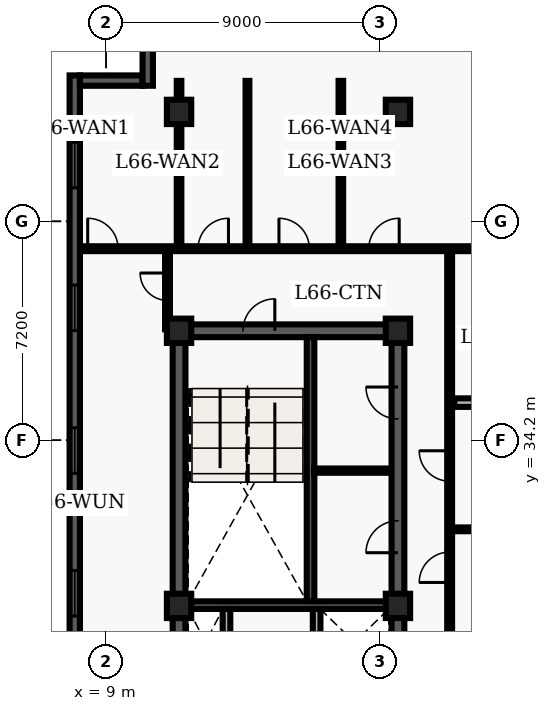
"""IFC4 building model, lengths in metres.
Left out: names, types, materials, properties, quantities, classifications, styles, units other than length and angle.
Written with IfcOpenShell. Run it as: python <this file> out.ifc"""

import sys

from ifc_helpers import new_model, entity, si_unit, converted_unit, direction, frame, origin_with_axes, origin_2d_with_axis, place, context, subcontext, project, spatial, polyline, rectangle, outline, extrude, element, fill, save


model = new_model("IFC4")
c1 = context("Model", 3, precision=1e-05, world=origin_with_axes(), true_north=direction((0.0, 1.0)))
c2 = subcontext(c1, "Body", "Model", "MODEL_VIEW")
j1 = project(units=[si_unit("LENGTHUNIT", "METRE"), converted_unit("PLANEANGLEUNIT", "DEGREE", entity("IfcPlaneAngleMeasure", 0.017), si_unit("PLANEANGLEUNIT", "RADIAN"), dimensions=[0, 0, 0, 0, 0, 0, 0])], contexts=[c1])
p1 = place(None, origin_with_axes())
s1 = spatial("IfcSite", under=j1, at=p1, CompositionType="ELEMENT")
p2 = place(p1, origin_with_axes())
s2 = spatial("IfcBuilding", under=s1, at=p2, CompositionType="ELEMENT")
p3 = place(p2, frame((0.0, 0.0, 268.5), z_axis=(0.0, 0.0, 1.0), x_axis=(1.0, 0.0, 0.0)))
s3 = spatial("IfcBuildingStorey", under=s2, at=p3, CompositionType="ELEMENT", Elevation=268.5)
p4 = place(p3, frame((11.4, 10.8, 0.0), z_axis=(0.0, 0.0, 1.0), x_axis=(0.0, 1.0, 0.0)))
e1 = element("IfcWall", 1, at=p4, inside=s3, PredefinedType="SHEAR", context=c2, shape_type="SweptSolid", body=[
    extrude(outline(polyline([(0.0, -0.21), (27.0, -0.21), (27.0, 0.21), (0.0, 0.21), (0.0, -0.21)])), origin_with_axes(), (0.0, 0.0, 1.0), 3.66),
])
p5 = place(p3, frame((11.4, 37.8, 0.0), z_axis=(0.0, 0.0, 1.0), x_axis=(1.0, 0.0, 0.0)))
e2 = element("IfcWall", 2, at=p5, inside=s3, PredefinedType="SHEAR", context=c2, shape_type="SweptSolid", body=[
    extrude(outline(polyline([(0.0, -0.21), (7.2, -0.21), (7.2, 0.21), (0.0, 0.21), (0.0, -0.21)])), origin_with_axes(), (0.0, 0.0, 1.0), 3.66),
])
p6 = place(p5, frame((2.625, 0.0, 0.0), z_axis=(0.0, 0.0, 1.0), x_axis=(1.0, 0.0, 0.0)))
e3 = element("IfcOpeningElement", 3, at=p6, cuts=e2, PredefinedType="OPENING", context=c2, shape_type="SweptSolid", body=[
    extrude(rectangle(XDim=1.05, YDim=0.44, at=origin_2d_with_axis()), origin_with_axes(), (0.0, 0.0, 1.0), 2.15),
])
p7 = place(p3, frame((18.6, 24.3, 0.0), z_axis=(0.0, 0.0, 1.0), x_axis=(0.0, 1.0, 0.0)))
e4 = element("IfcWall", 4, at=p7, inside=s3, PredefinedType="SHEAR", context=c2, shape_type="SweptSolid", body=[
    extrude(outline(polyline([(0.0, -0.21), (13.5, -0.21), (13.5, 0.21), (0.0, 0.21), (0.0, -0.21)])), origin_with_axes(), (0.0, 0.0, 1.0), 3.66),
])
p8 = place(p7, frame((6.725, 0.0, 0.0), z_axis=(0.0, 0.0, 1.0), x_axis=(1.0, 0.0, 0.0)))
e5 = element("IfcOpeningElement", 5, at=p8, cuts=e4, PredefinedType="OPENING", context=c2, shape_type="SweptSolid", body=[
    extrude(rectangle(XDim=1.05, YDim=0.44, at=origin_2d_with_axis()), origin_with_axes(), (0.0, 0.0, 1.0), 2.15),
])
p9 = place(p7, frame((11.125, 0.0, 0.0), z_axis=(0.0, 0.0, 1.0), x_axis=(1.0, 0.0, 0.0)))
e6 = element("IfcOpeningElement", 6, at=p9, cuts=e4, PredefinedType="OPENING", context=c2, shape_type="SweptSolid", body=[
    extrude(rectangle(XDim=1.05, YDim=0.44, at=origin_2d_with_axis()), origin_with_axes(), (0.0, 0.0, 1.0), 2.15),
])
p10 = place(p3, frame((15.725, 28.9, 0.0), z_axis=(0.0, 0.0, 1.0), x_axis=(0.0, 1.0, 0.0)))
e7 = element("IfcWall", 7, at=p10, inside=s3, PredefinedType="SHEAR", context=c2, shape_type="SweptSolid", body=[
    extrude(outline(polyline([(0.0, -0.125), (8.69, -0.125), (8.69, 0.125), (0.0, 0.125), (0.0, -0.125)])), origin_with_axes(), (0.0, 0.0, 1.0), 3.66),
])
p11 = place(p3, frame((11.61, 28.775, 0.0), z_axis=(0.0, 0.0, 1.0), x_axis=(1.0, 0.0, 0.0)))
e8 = element("IfcWall", 8, at=p11, inside=s3, PredefinedType="SHEAR", context=c2, shape_type="SweptSolid", body=[
    extrude(outline(polyline([(0.0, -0.125), (6.78, -0.125), (6.78, 0.125), (0.0, 0.125), (0.0, -0.125)])), origin_with_axes(), (0.0, 0.0, 1.0), 3.66),
])
for number, where, z_axis, x_axis in (
    (9, (12.96, 26.45, 0.0), (0.0, 0.0, 1.0), (0.0, 1.0, 0.0)),
    (10, (15.925, 26.45, 0.0), (0.0, 0.0, 1.0), (0.0, 1.0, 0.0)),
):
    element("IfcWall", number, at=place(p3, frame(where, z_axis=z_axis, x_axis=x_axis)), inside=s3, PredefinedType="SOLIDWALL", context=c2, shape_type="SweptSolid", body=[
        extrude(outline(polyline([(0.0, -0.125), (2.2, -0.125), (2.2, 0.125), (0.0, 0.125), (0.0, -0.125)])), origin_with_axes(), (0.0, 0.0, 1.0), 2.7),
    ])
for number, where, z_axis, x_axis in (
    (11, (11.4, 28.75, 0.0), (0.0, 0.0, 1.0), (1.0, 0.0, 0.0)),
    (12, (11.4, 37.8, 0.0), (0.0, 0.0, 1.0), (1.0, 0.0, 0.0)),
    (13, (11.4, 45.0, 0.0), (0.0, 0.0, 1.0), (1.0, 0.0, 0.0)),
    (14, (18.6, 28.75, 0.0), (0.0, 0.0, 1.0), (1.0, 0.0, 0.0)),
    (15, (18.6, 37.8, 0.0), (0.0, 0.0, 1.0), (1.0, 0.0, 0.0)),
    (16, (18.6, 45.0, 0.0), (0.0, 0.0, 1.0), (1.0, 0.0, 0.0)),
):
    element("IfcColumn", number, at=place(p3, frame(where, z_axis=z_axis, x_axis=x_axis)), inside=s3, PredefinedType="COLUMN", context=c2, shape_type="SweptSolid", body=[
        extrude(rectangle(XDim=0.8, YDim=0.8, at=origin_2d_with_axis()), origin_with_axes(), (0.0, 0.0, 1.0), 3.9),
    ])
p12 = place(p3, frame((15.84, 33.2, 0.0), z_axis=(0.0, 0.0, 1.0), x_axis=(1.0, 0.0, 0.0)))
e17 = element("IfcWall", 17, at=p12, inside=s3, PredefinedType="PARTITIONING", context=c2, shape_type="SweptSolid", body=[
    extrude(outline(polyline([(0.0, -0.07), (2.46, -0.07), (2.46, 0.07), (0.0, 0.07), (0.0, -0.07)])), origin_with_axes(), (0.0, 0.0, 1.0), 2.7),
])
p13 = place(p3, frame((8.135, 40.5, 0.0), z_axis=(0.0, 0.0, 1.0), x_axis=(1.0, 0.0, 0.0)))
e18 = element("IfcWall", 18, at=p13, inside=s3, PredefinedType="PARTITIONING", context=c2, shape_type="SweptSolid", body=[
    extrude(outline(polyline([(0.0, -0.08), (23.93, -0.08), (23.93, 0.08), (0.0, 0.08), (0.0, -0.08)])), origin_with_axes(), (0.0, 0.0, 1.0), 2.7),
])
p14 = place(p13, frame((0.76, 0.0, 0.0), z_axis=(0.0, 0.0, 1.0), x_axis=(1.0, 0.0, 0.0)))
e19 = element("IfcOpeningElement", 19, at=p14, cuts=e18, PredefinedType="OPENING", context=c2, shape_type="SweptSolid", body=[
    extrude(rectangle(XDim=1.0, YDim=0.18, at=origin_2d_with_axis()), origin_with_axes(), (0.0, 0.0, 1.0), 2.15),
])
p15 = place(p13, frame((4.39, 0.0, 0.0), z_axis=(0.0, 0.0, 1.0), x_axis=(1.0, 0.0, 0.0)))
e20 = element("IfcOpeningElement", 20, at=p15, cuts=e18, PredefinedType="OPENING", context=c2, shape_type="SweptSolid", body=[
    extrude(rectangle(XDim=1.0, YDim=0.18, at=origin_2d_with_axis()), origin_with_axes(), (0.0, 0.0, 1.0), 2.15),
])
p16 = place(p13, frame((7.051, 0.0, 0.0), z_axis=(0.0, 0.0, 1.0), x_axis=(1.0, 0.0, 0.0)))
e21 = element("IfcOpeningElement", 21, at=p16, cuts=e18, PredefinedType="OPENING", context=c2, shape_type="SweptSolid", body=[
    extrude(rectangle(XDim=1.0, YDim=0.18, at=origin_2d_with_axis()), origin_with_axes(), (0.0, 0.0, 1.0), 2.15),
])
p17 = place(p13, frame((10.006, 0.0, 0.0), z_axis=(0.0, 0.0, 1.0), x_axis=(1.0, 0.0, 0.0)))
e22 = element("IfcOpeningElement", 22, at=p17, cuts=e18, PredefinedType="OPENING", context=c2, shape_type="SweptSolid", body=[
    extrude(rectangle(XDim=1.0, YDim=0.18, at=origin_2d_with_axis()), origin_with_axes(), (0.0, 0.0, 1.0), 2.15),
])
p18 = place(p3, frame((20.3, 7.8, 0.0), z_axis=(0.0, 0.0, 1.0), x_axis=(0.0, 1.0, 0.0)))
e23 = element("IfcWall", 23, at=p18, inside=s3, PredefinedType="PARTITIONING", context=c2, shape_type="SweptSolid", body=[
    extrude(outline(polyline([(0.0, -0.08), (32.7, -0.08), (32.7, 0.08), (0.0, 0.08), (0.0, -0.08)])), origin_with_axes(), (0.0, 0.0, 1.0), 2.7),
])
p19 = place(p18, frame((14.2, 0.0, 0.0), z_axis=(0.0, 0.0, 1.0), x_axis=(1.0, 0.0, 0.0)))
e24 = element("IfcOpeningElement", 24, at=p19, cuts=e23, PredefinedType="OPENING", context=c2, shape_type="SweptSolid", body=[
    extrude(rectangle(XDim=1.0, YDim=0.18, at=origin_2d_with_axis()), origin_with_axes(), (0.0, 0.0, 1.0), 2.15),
])
p20 = place(p18, frame((18.215, 0.0, 0.0), z_axis=(0.0, 0.0, 1.0), x_axis=(1.0, 0.0, 0.0)))
e25 = element("IfcOpeningElement", 25, at=p20, cuts=e23, PredefinedType="OPENING", context=c2, shape_type="SweptSolid", body=[
    extrude(rectangle(XDim=1.0, YDim=0.18, at=origin_2d_with_axis()), origin_with_axes(), (0.0, 0.0, 1.0), 2.15),
])
p21 = place(p18, frame((22.221, 0.0, 0.0), z_axis=(0.0, 0.0, 1.0), x_axis=(1.0, 0.0, 0.0)))
e26 = element("IfcOpeningElement", 26, at=p21, cuts=e23, PredefinedType="OPENING", context=c2, shape_type="SweptSolid", body=[
    extrude(rectangle(XDim=1.0, YDim=0.18, at=origin_2d_with_axis()), origin_with_axes(), (0.0, 0.0, 1.0), 2.15),
])
p22 = place(p18, frame((25.553, 0.0, 0.0), z_axis=(0.0, 0.0, 1.0), x_axis=(1.0, 0.0, 0.0)))
e27 = element("IfcOpeningElement", 27, at=p22, cuts=e23, PredefinedType="OPENING", context=c2, shape_type="SweptSolid", body=[
    extrude(rectangle(XDim=1.0, YDim=0.18, at=origin_2d_with_axis()), origin_with_axes(), (0.0, 0.0, 1.0), 2.15),
])
p23 = place(p18, frame((5.475, 0.0, 0.0), z_axis=(0.0, 0.0, 1.0), x_axis=(1.0, 0.0, 0.0)))
e28 = element("IfcOpeningElement", 28, at=p23, cuts=e23, PredefinedType="OPENING", context=c2, shape_type="SweptSolid", body=[
    extrude(rectangle(XDim=1.05, YDim=0.18, at=origin_2d_with_axis()), origin_with_axes(), (0.0, 0.0, 1.0), 2.15),
])
p24 = place(p3, frame((11.02, 37.85, 0.0), z_axis=(0.0, 0.0, 1.0), x_axis=(0.0, 1.0, 0.0)))
e29 = element("IfcWall", 29, at=p24, inside=s3, PredefinedType="PARTITIONING", context=c2, shape_type="SweptSolid", body=[
    extrude(outline(polyline([(0.0, -0.08), (2.65, -0.08), (2.65, 0.08), (0.0, 0.08), (0.0, -0.08)])), origin_with_axes(), (0.0, 0.0, 1.0), 2.7),
])
p25 = place(p24, frame((1.4, 0.0, 0.0), z_axis=(0.0, 0.0, 1.0), x_axis=(1.0, 0.0, 0.0)))
e30 = element("IfcOpeningElement", 30, at=p25, cuts=e29, PredefinedType="OPENING", context=c2, shape_type="SweptSolid", body=[
    extrude(rectangle(XDim=0.9, YDim=0.18, at=origin_2d_with_axis()), origin_with_axes(), (0.0, 0.0, 1.0), 2.15),
])
p26 = place(p3, frame((11.4, 40.6, 0.0), z_axis=(0.0, 0.0, 1.0), x_axis=(0.0, 1.0, 0.0)))
e31 = element("IfcWall", 31, at=p26, inside=s3, PredefinedType="PARTITIONING", context=c2, shape_type="SweptSolid", body=[
    extrude(outline(polyline([(0.0, -0.075), (5.42, -0.075), (5.42, 0.075), (0.0, 0.075), (0.0, -0.075)])), origin_with_axes(), (0.0, 0.0, 1.0), 2.7),
])
p27 = place(p3, frame((13.65, 40.6, 0.0), z_axis=(0.0, 0.0, 1.0), x_axis=(0.0, 1.0, 0.0)))
e32 = element("IfcWall", 32, at=p27, inside=s3, PredefinedType="PARTITIONING", context=c2, shape_type="SweptSolid", body=[
    extrude(outline(polyline([(0.0, -0.062), (5.42, -0.062), (5.42, 0.062), (0.0, 0.062), (0.0, -0.062)])), origin_with_axes(), (0.0, 0.0, 1.0), 2.7),
])
p28 = place(p3, frame((16.722, 40.6, 0.0), z_axis=(0.0, 0.0, 1.0), x_axis=(0.0, 1.0, 0.0)))
e33 = element("IfcWall", 33, at=p28, inside=s3, PredefinedType="PARTITIONING", context=c2, shape_type="SweptSolid", body=[
    extrude(outline(polyline([(0.0, -0.075), (5.42, -0.075), (5.42, 0.075), (0.0, 0.075), (0.0, -0.075)])), origin_with_axes(), (0.0, 0.0, 1.0), 2.7),
])
p29 = place(p3, frame((20.45, 31.269, 0.0), z_axis=(0.0, 0.0, 1.0), x_axis=(1.0, 0.0, 0.0)))
e34 = element("IfcWall", 34, at=p29, inside=s3, PredefinedType="PARTITIONING", context=c2, shape_type="SweptSolid", body=[
    extrude(outline(polyline([(0.0, -0.062), (11.615, -0.062), (11.615, 0.062), (0.0, 0.062), (0.0, -0.062)])), origin_with_axes(), (0.0, 0.0, 1.0), 2.7),
])
p30 = place(p3, frame((20.45, 35.437, 0.0), z_axis=(0.0, 0.0, 1.0), x_axis=(1.0, 0.0, 0.0)))
e35 = element("IfcWall", 35, at=p30, inside=s3, PredefinedType="PARTITIONING", context=c2, shape_type="SweptSolid", body=[
    extrude(outline(polyline([(0.0, -0.14), (11.615, -0.14), (11.615, 0.14), (0.0, 0.14), (0.0, -0.14)])), origin_with_axes(), (0.0, 0.0, 1.0), 2.7),
])
p31 = place(p30, frame((3.375, 0.0, 0.0), z_axis=(0.0, 0.0, 1.0), x_axis=(1.0, 0.0, 0.0)))
e36 = element("IfcOpeningElement", 36, at=p31, cuts=e35, PredefinedType="OPENING", context=c2, shape_type="SweptSolid", body=[
    extrude(rectangle(XDim=0.95, YDim=0.3, at=origin_2d_with_axis()), origin_with_axes(), (0.0, 0.0, 1.0), 2.15),
])
p32 = place(p3, frame((7.97, 2.74, 0.0), z_axis=(0.0, 0.0, 1.0), x_axis=(0.0, 1.0, 0.0)))
e37 = element("IfcWall", 37, at=p32, inside=s3, PredefinedType="SOLIDWALL", context=c2, shape_type="SweptSolid", body=[
    extrude(outline(polyline([(0.0, -0.17), (43.46, -0.17), (43.46, 0.17), (0.0, 0.17), (0.0, -0.17)])), origin_with_axes(), (0.0, 0.0, 1.0), 3.66),
])
p33 = place(p32, frame((2.948, 0.0, 0.45), z_axis=(0.0, 0.0, 1.0), x_axis=(1.0, 0.0, 0.0)))
e38 = element("IfcOpeningElement", 38, at=p33, cuts=e37, PredefinedType="OPENING", context=c2, shape_type="SweptSolid", body=[
    extrude(rectangle(XDim=1.5, YDim=0.36, at=origin_2d_with_axis()), origin_with_axes(), (0.0, 0.0, 1.0), 2.1),
])
p34 = place(p32, frame((7.643, 0.0, 0.45), z_axis=(0.0, 0.0, 1.0), x_axis=(1.0, 0.0, 0.0)))
e39 = element("IfcOpeningElement", 39, at=p34, cuts=e37, PredefinedType="OPENING", context=c2, shape_type="SweptSolid", body=[
    extrude(rectangle(XDim=1.5, YDim=0.36, at=origin_2d_with_axis()), origin_with_axes(), (0.0, 0.0, 1.0), 2.1),
])
p35 = place(p32, frame((12.339, 0.0, 0.45), z_axis=(0.0, 0.0, 1.0), x_axis=(1.0, 0.0, 0.0)))
e40 = element("IfcOpeningElement", 40, at=p35, cuts=e37, PredefinedType="OPENING", context=c2, shape_type="SweptSolid", body=[
    extrude(rectangle(XDim=1.5, YDim=0.36, at=origin_2d_with_axis()), origin_with_axes(), (0.0, 0.0, 1.0), 2.1),
])
p36 = place(p32, frame((17.034, 0.0, 0.45), z_axis=(0.0, 0.0, 1.0), x_axis=(1.0, 0.0, 0.0)))
e41 = element("IfcOpeningElement", 41, at=p36, cuts=e37, PredefinedType="OPENING", context=c2, shape_type="SweptSolid", body=[
    extrude(rectangle(XDim=1.5, YDim=0.36, at=origin_2d_with_axis()), origin_with_axes(), (0.0, 0.0, 1.0), 2.1),
])
p37 = place(p32, frame((22.58, 0.0, 0.45), z_axis=(0.0, 0.0, 1.0), x_axis=(1.0, 0.0, 0.0)))
e42 = element("IfcOpeningElement", 42, at=p37, cuts=e37, PredefinedType="OPENING", context=c2, shape_type="SweptSolid", body=[
    extrude(rectangle(XDim=1.5, YDim=0.36, at=origin_2d_with_axis()), origin_with_axes(), (0.0, 0.0, 1.0), 2.1),
])
p38 = place(p32, frame((26.426, 0.0, 0.45), z_axis=(0.0, 0.0, 1.0), x_axis=(1.0, 0.0, 0.0)))
e43 = element("IfcOpeningElement", 43, at=p38, cuts=e37, PredefinedType="OPENING", context=c2, shape_type="SweptSolid", body=[
    extrude(rectangle(XDim=1.5, YDim=0.36, at=origin_2d_with_axis()), origin_with_axes(), (0.0, 0.0, 1.0), 2.1),
])
p39 = place(p32, frame((31.121, 0.0, 0.45), z_axis=(0.0, 0.0, 1.0), x_axis=(1.0, 0.0, 0.0)))
e44 = element("IfcOpeningElement", 44, at=p39, cuts=e37, PredefinedType="OPENING", context=c2, shape_type="SweptSolid", body=[
    extrude(rectangle(XDim=1.5, YDim=0.36, at=origin_2d_with_axis()), origin_with_axes(), (0.0, 0.0, 1.0), 2.1),
])
p40 = place(p32, frame((35.817, 0.0, 0.45), z_axis=(0.0, 0.0, 1.0), x_axis=(1.0, 0.0, 0.0)))
e45 = element("IfcOpeningElement", 45, at=p40, cuts=e37, PredefinedType="OPENING", context=c2, shape_type="SweptSolid", body=[
    extrude(rectangle(XDim=1.5, YDim=0.36, at=origin_2d_with_axis()), origin_with_axes(), (0.0, 0.0, 1.0), 2.1),
])
p41 = place(p32, frame((40.512, 0.0, 0.45), z_axis=(0.0, 0.0, 1.0), x_axis=(1.0, 0.0, 0.0)))
e46 = element("IfcOpeningElement", 46, at=p41, cuts=e37, PredefinedType="OPENING", context=c2, shape_type="SweptSolid", body=[
    extrude(rectangle(XDim=1.5, YDim=0.36, at=origin_2d_with_axis()), origin_with_axes(), (0.0, 0.0, 1.0), 2.1),
])
p42 = place(p3, frame((8.14, 46.03, 0.0), z_axis=(0.0, 0.0, 1.0), x_axis=(1.0, 0.0, 0.0)))
e47 = element("IfcWall", 47, at=p42, inside=s3, PredefinedType="SOLIDWALL", context=c2, shape_type="SweptSolid", body=[
    extrude(outline(polyline([(0.0, -0.17), (2.06, -0.17), (2.06, 0.17), (0.0, 0.17), (0.0, -0.17)])), origin_with_axes(), (0.0, 0.0, 1.0), 3.66),
])
p43 = place(p3, frame((10.37, 45.86, 0.0), z_axis=(0.0, 0.0, 1.0), x_axis=(0.0, 1.0, 0.0)))
e48 = element("IfcWall", 48, at=p43, inside=s3, PredefinedType="SOLIDWALL", context=c2, shape_type="SweptSolid", body=[
    extrude(outline(polyline([(0.0, -0.17), (2.74, -0.17), (2.74, 0.17), (0.0, 0.17), (0.0, -0.17)])), origin_with_axes(), (0.0, 0.0, 1.0), 3.66),
])
p44 = place(p5, frame((2.625, 0.0, 0.0), z_axis=(0.0, 0.0, 1.0), x_axis=(1.0, 0.0, 0.0)))
e49 = element("IfcDoor", 49, at=p44, inside=s3, OperationType="SINGLE_SWING_RIGHT", PredefinedType="DOOR", context=c2, shape_type="SweptSolid", body=[
    extrude(rectangle(XDim=1.05, YDim=0.09, at=origin_2d_with_axis()), origin_with_axes(), (0.0, 0.0, 1.0), 2.15),
])
fill(e3, e49)
p45 = place(p7, frame((6.725, 0.0, 0.0), z_axis=(0.0, 0.0, 1.0), x_axis=(1.0, 0.0, 0.0)))
e50 = element("IfcDoor", 50, at=p45, inside=s3, OperationType="SINGLE_SWING_LEFT", PredefinedType="DOOR", context=c2, shape_type="SweptSolid", body=[
    extrude(rectangle(XDim=1.05, YDim=0.09, at=origin_2d_with_axis()), origin_with_axes(), (0.0, 0.0, 1.0), 2.15),
])
fill(e5, e50)
p46 = place(p7, frame((11.125, 0.0, 0.0), z_axis=(0.0, 0.0, 1.0), x_axis=(1.0, 0.0, 0.0)))
e51 = element("IfcDoor", 51, at=p46, inside=s3, OperationType="SINGLE_SWING_RIGHT", PredefinedType="DOOR", context=c2, shape_type="SweptSolid", body=[
    extrude(rectangle(XDim=1.05, YDim=0.09, at=origin_2d_with_axis()), origin_with_axes(), (0.0, 0.0, 1.0), 2.15),
])
fill(e6, e51)
p47 = place(p24, frame((1.4, 0.0, 0.0), z_axis=(0.0, 0.0, 1.0), x_axis=(1.0, 0.0, 0.0)))
e52 = element("IfcDoor", 52, at=p47, inside=s3, OperationType="SINGLE_SWING_RIGHT", PredefinedType="DOOR", context=c2, shape_type="SweptSolid", body=[
    extrude(rectangle(XDim=0.9, YDim=0.09, at=origin_2d_with_axis()), origin_with_axes(), (0.0, 0.0, 1.0), 2.15),
])
fill(e30, e52)
p48 = place(p13, frame((0.76, 0.0, 0.0), z_axis=(0.0, 0.0, 1.0), x_axis=(1.0, 0.0, 0.0)))
e53 = element("IfcDoor", 53, at=p48, inside=s3, OperationType="SINGLE_SWING_LEFT", PredefinedType="DOOR", context=c2, shape_type="SweptSolid", body=[
    extrude(rectangle(XDim=1.0, YDim=0.09, at=origin_2d_with_axis()), origin_with_axes(), (0.0, 0.0, 1.0), 2.15),
])
fill(e19, e53)
p49 = place(p13, frame((4.39, 0.0, 0.0), z_axis=(0.0, 0.0, 1.0), x_axis=(1.0, 0.0, 0.0)))
e54 = element("IfcDoor", 54, at=p49, inside=s3, OperationType="SINGLE_SWING_RIGHT", PredefinedType="DOOR", context=c2, shape_type="SweptSolid", body=[
    extrude(rectangle(XDim=1.0, YDim=0.09, at=origin_2d_with_axis()), origin_with_axes(), (0.0, 0.0, 1.0), 2.15),
])
fill(e20, e54)
p50 = place(p13, frame((7.051, 0.0, 0.0), z_axis=(0.0, 0.0, 1.0), x_axis=(1.0, 0.0, 0.0)))
e55 = element("IfcDoor", 55, at=p50, inside=s3, OperationType="SINGLE_SWING_LEFT", PredefinedType="DOOR", context=c2, shape_type="SweptSolid", body=[
    extrude(rectangle(XDim=1.0, YDim=0.09, at=origin_2d_with_axis()), origin_with_axes(), (0.0, 0.0, 1.0), 2.15),
])
fill(e21, e55)
p51 = place(p13, frame((10.006, 0.0, 0.0), z_axis=(0.0, 0.0, 1.0), x_axis=(1.0, 0.0, 0.0)))
e56 = element("IfcDoor", 56, at=p51, inside=s3, OperationType="SINGLE_SWING_RIGHT", PredefinedType="DOOR", context=c2, shape_type="SweptSolid", body=[
    extrude(rectangle(XDim=1.0, YDim=0.09, at=origin_2d_with_axis()), origin_with_axes(), (0.0, 0.0, 1.0), 2.15),
])
fill(e22, e56)
p52 = place(p18, frame((22.221, 0.0, 0.0), z_axis=(0.0, 0.0, 1.0), x_axis=(1.0, 0.0, 0.0)))
e57 = element("IfcDoor", 57, at=p52, inside=s3, OperationType="SINGLE_SWING_LEFT", PredefinedType="DOOR", context=c2, shape_type="SweptSolid", body=[
    extrude(rectangle(XDim=1.0, YDim=0.09, at=origin_2d_with_axis()), origin_with_axes(), (0.0, 0.0, 1.0), 2.15),
])
fill(e26, e57)
p53 = place(p18, frame((25.553, 0.0, 0.0), z_axis=(0.0, 0.0, 1.0), x_axis=(1.0, 0.0, 0.0)))
e58 = element("IfcDoor", 58, at=p53, inside=s3, OperationType="SINGLE_SWING_RIGHT", PredefinedType="DOOR", context=c2, shape_type="SweptSolid", body=[
    extrude(rectangle(XDim=1.0, YDim=0.09, at=origin_2d_with_axis()), origin_with_axes(), (0.0, 0.0, 1.0), 2.15),
])
fill(e27, e58)
p54 = place(p32, frame((26.426, 0.0, 0.45), z_axis=(0.0, 0.0, 1.0), x_axis=(1.0, 0.0, 0.0)))
e59 = element("IfcWindow", 59, at=p54, inside=s3, PredefinedType="WINDOW", context=c2, shape_type="SweptSolid", body=[
    extrude(rectangle(XDim=1.5, YDim=0.09, at=origin_2d_with_axis()), origin_with_axes(), (0.0, 0.0, 1.0), 2.1),
])
fill(e43, e59)
p55 = place(p32, frame((31.121, 0.0, 0.45), z_axis=(0.0, 0.0, 1.0), x_axis=(1.0, 0.0, 0.0)))
e60 = element("IfcWindow", 60, at=p55, inside=s3, PredefinedType="WINDOW", context=c2, shape_type="SweptSolid", body=[
    extrude(rectangle(XDim=1.5, YDim=0.09, at=origin_2d_with_axis()), origin_with_axes(), (0.0, 0.0, 1.0), 2.1),
])
fill(e44, e60)
p56 = place(p32, frame((35.817, 0.0, 0.45), z_axis=(0.0, 0.0, 1.0), x_axis=(1.0, 0.0, 0.0)))
e61 = element("IfcWindow", 61, at=p56, inside=s3, PredefinedType="WINDOW", context=c2, shape_type="SweptSolid", body=[
    extrude(rectangle(XDim=1.5, YDim=0.09, at=origin_2d_with_axis()), origin_with_axes(), (0.0, 0.0, 1.0), 2.1),
])
fill(e45, e61)
p57 = place(p32, frame((40.512, 0.0, 0.45), z_axis=(0.0, 0.0, 1.0), x_axis=(1.0, 0.0, 0.0)))
e62 = element("IfcWindow", 62, at=p57, inside=s3, PredefinedType="WINDOW", context=c2, shape_type="SweptSolid", body=[
    extrude(rectangle(XDim=1.5, YDim=0.09, at=origin_2d_with_axis()), origin_with_axes(), (0.0, 0.0, 1.0), 2.1),
])
fill(e46, e62)
save(model, sys.argv[1])
